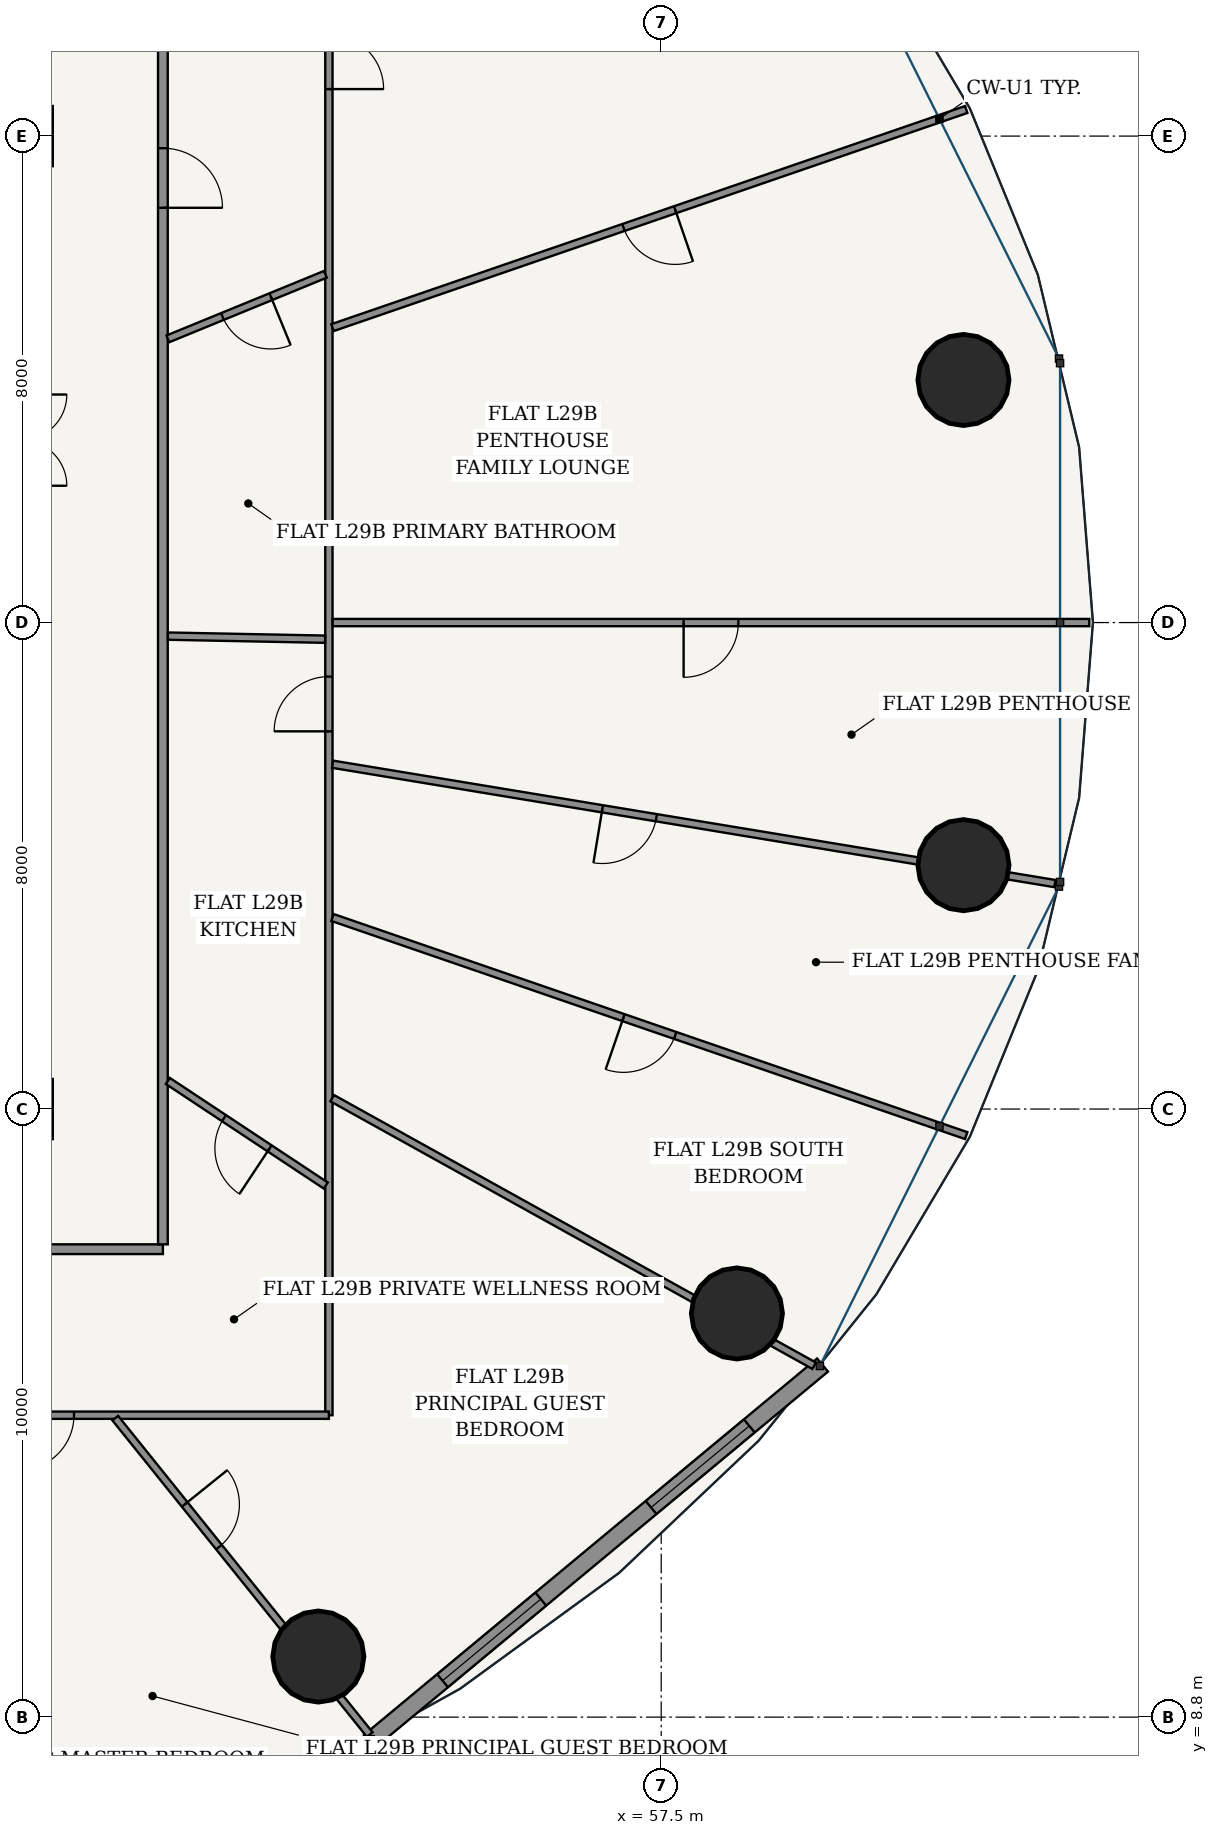
"""IFC4 building model, lengths in metres.
Left out: names, types, materials, properties, quantities, classifications, styles, units other than length and angle.
Written with IfcOpenShell. Run it as: python <this file> out.ifc"""

import sys

from ifc_helpers import new_model, si_unit, direction, frame, frame_2d, origin, origin_2d, place, context, subcontext, project, spatial, rectangle, hollow_circle, extrude, source, transform, mapped, element, fill, save


model = new_model("IFC4")
c1 = context("Model", 3, precision=1e-05, world=origin(), true_north=direction((-0.2419218956, 0.970295726276)))
c2 = subcontext(c1, "Body", "Model", "MODEL_VIEW")
j1 = project(units=[si_unit("LENGTHUNIT", "METRE"), si_unit("PLANEANGLEUNIT", "RADIAN")], contexts=[c1])
p1 = place(None, origin())
s1 = spatial("IfcSite", under=j1, at=p1, CompositionType="ELEMENT")
p2 = place(p1, origin())
s2 = spatial("IfcBuilding", under=s1, at=p2, CompositionType="ELEMENT")
p3 = place(p2, frame((0.0, 0.0, 112.2)))
s3 = spatial("IfcBuildingStorey", under=s2, at=p3, CompositionType="ELEMENT", Elevation=112.2)
for number, where, z_axis, x_axis in (
    (1, (62.471, 30.79, 0.0), (0.0, 0.0, 1.0), (1.0, 0.0, 0.0)),
    (2, (51.862, 9.796, 0.0), (0.0, 0.0, 1.0), (1.0, 0.0, 0.0)),
    (3, (58.745, 15.438, 0.0), (0.0, 0.0, 1.0), (1.0, 0.0, 0.0)),
    (4, (62.471, 22.81, 0.0), (0.0, 0.0, 1.0), (1.0, 0.0, 0.0)),
):
    element("IfcColumn", number, at=place(p3, frame(where, z_axis=z_axis, x_axis=x_axis)), inside=s3, PredefinedType="COLUMN", context=c2, shape_type="SweptSolid", body=[
        extrude(hollow_circle(Radius=0.75, WallThickness=0.045, at=origin_2d()), origin(), (0.0, 0.0, 1.0), 3.6),
    ])
p4 = place(p3, frame((52.7, 8.398, 0.0), z_axis=(0.0, 0.0, 1.0), x_axis=(0.769254958887, 0.638941944333, 0.0)))
e5 = element("IfcWall", 5, at=p4, inside=s3, PredefinedType="SOLIDWALL", context=c2, shape_type="SweptSolid", body=[
    extrude(rectangle(XDim=9.69, YDim=0.28, at=frame_2d((4.845, 0.0))), origin(), (0.0, 0.0, 1.0), 3.325),
])
p5 = place(p4, frame((1.566, 0.0, 0.85)))
e6 = element("IfcOpeningElement", 6, at=p5, cuts=e5, PredefinedType="OPENING", context=c2, shape_type="SweptSolid", body=[
    extrude(rectangle(XDim=2.1, YDim=1.95, at=frame_2d((1.05, 0.975))), frame((0.0, 0.15, 0.0), z_axis=(0.0, -1.0, 0.0), x_axis=(1.0, 0.0, 0.0)), (0.0, 0.0, 1.0), 0.3),
])
p6 = place(p4, frame((6.023, 0.0, 0.85)))
e7 = element("IfcOpeningElement", 7, at=p6, cuts=e5, PredefinedType="OPENING", context=c2, shape_type="SweptSolid", body=[
    extrude(rectangle(XDim=2.1, YDim=1.95, at=frame_2d((1.05, 0.975))), frame((0.0, 0.15, 0.0), z_axis=(0.0, -1.0, 0.0), x_axis=(1.0, 0.0, 0.0)), (0.0, 0.0, 1.0), 0.3),
])
p7 = place(p3, frame((26.695, 16.495, 0.0), z_axis=(0.0, 0.0, 1.0), x_axis=(1.0, 0.0, 0.0)))
e8 = element("IfcWall", 8, at=p7, inside=s3, PredefinedType="PARTITIONING", context=c2, shape_type="SweptSolid", body=[
    extrude(rectangle(XDim=22.61, YDim=0.16, at=frame_2d((11.305, 0.0))), origin(), (0.0, 0.0, 1.0), 2.767),
])
p8 = place(p3, frame((49.305, 16.575, 0.0), z_axis=(0.0, 0.0, 1.0), x_axis=(0.0, 1.0, 0.0)))
e9 = element("IfcWall", 9, at=p8, inside=s3, PredefinedType="PARTITIONING", context=c2, shape_type="SweptSolid", body=[
    extrude(rectangle(XDim=20.45, YDim=0.16, at=frame_2d((10.225, 0.0))), origin(), (0.0, 0.0, 1.0), 2.767),
])
p9 = place(p8, frame((17.046, 0.0, 0.0)))
e10 = element("IfcOpeningElement", 10, at=p9, cuts=e9, PredefinedType="OPENING", context=c2, shape_type="SweptSolid", body=[
    extrude(rectangle(XDim=0.98, YDim=2.2, at=frame_2d((0.49, 1.1))), frame((0.0, 0.09, 0.0), z_axis=(0.0, -1.0, 0.0), x_axis=(1.0, 0.0, 0.0)), (0.0, 0.0, 1.0), 0.18),
])
p10 = place(p3, frame((52.035, 39.835, 0.0), z_axis=(0.0, 0.0, 1.0), x_axis=(0.0, -1.0, 0.0)))
e11 = element("IfcWall", 11, at=p10, inside=s3, PredefinedType="PARTITIONING", context=c2, shape_type="SweptSolid", body=[
    extrude(rectangle(XDim=26.07, YDim=0.12, at=frame_2d((13.035, 0.0))), origin(), (0.0, 0.0, 1.0), 2.767),
])
p11 = place(p10, frame((3.362, 0.0, 0.0)))
e12 = element("IfcOpeningElement", 12, at=p11, cuts=e11, PredefinedType="OPENING", context=c2, shape_type="SweptSolid", body=[
    extrude(rectangle(XDim=0.9, YDim=2.15, at=frame_2d((0.45, 1.075))), frame((0.0, 0.07, 0.0), z_axis=(0.0, -1.0, 0.0), x_axis=(1.0, 0.0, 0.0)), (0.0, 0.0, 1.0), 0.14),
])
p12 = place(p10, frame((13.924, 0.0, 0.0)))
e13 = element("IfcOpeningElement", 13, at=p12, cuts=e11, PredefinedType="OPENING", context=c2, shape_type="SweptSolid", body=[
    extrude(rectangle(XDim=0.9, YDim=2.15, at=frame_2d((0.45, 1.075))), frame((0.0, 0.07, 0.0), z_axis=(0.0, -1.0, 0.0), x_axis=(1.0, 0.0, 0.0)), (0.0, 0.0, 1.0), 0.14),
])
p13 = place(p3, frame((52.035, 13.765, 0.0), z_axis=(0.0, 0.0, 1.0), x_axis=(-1.0, 0.0, 0.0)))
e14 = element("IfcWall", 14, at=p13, inside=s3, PredefinedType="PARTITIONING", context=c2, shape_type="SweptSolid", body=[
    extrude(rectangle(XDim=24.416, YDim=0.12, at=frame_2d((12.208, 0.0))), origin(), (0.0, 0.0, 1.0), 2.767),
])
p14 = place(p13, frame((4.192, 0.0, 0.0)))
e15 = element("IfcOpeningElement", 15, at=p14, cuts=e14, PredefinedType="OPENING", context=c2, shape_type="SweptSolid", body=[
    extrude(rectangle(XDim=0.9, YDim=2.15, at=frame_2d((0.45, 1.075))), frame((0.0, 0.07, 0.0), z_axis=(0.0, -1.0, 0.0), x_axis=(1.0, 0.0, 0.0)), (0.0, 0.0, 1.0), 0.14),
])
p15 = place(p13, frame((19.728, 0.0, 0.0)))
e16 = element("IfcOpeningElement", 16, at=p15, cuts=e14, PredefinedType="OPENING", context=c2, shape_type="SweptSolid", body=[
    extrude(rectangle(XDim=0.86, YDim=2.15, at=frame_2d((0.43, 1.075))), frame((0.0, 0.07, 0.0), z_axis=(0.0, -1.0, 0.0), x_axis=(1.0, 0.0, 0.0)), (0.0, 0.0, 1.0), 0.14),
])
p16 = place(p3, frame((44.526, 13.709, 0.0), z_axis=(0.0, 0.0, 1.0), x_axis=(0.446179583353, -0.894943450392, 0.0)))
e17 = element("IfcWall", 17, at=p16, inside=s3, PredefinedType="PARTITIONING", context=c2, shape_type="SweptSolid", body=[
    extrude(rectangle(XDim=8.125, YDim=0.12, at=frame_2d((4.062, 0.0))), origin(), (0.0, 0.0, 1.0), 2.767),
])
p17 = place(p16, frame((3.612, 0.0, 0.0)))
e18 = element("IfcOpeningElement", 18, at=p17, cuts=e17, PredefinedType="OPENING", context=c2, shape_type="SweptSolid", body=[
    extrude(rectangle(XDim=0.9, YDim=2.15, at=frame_2d((0.45, 1.075))), frame((0.0, 0.07, 0.0), z_axis=(0.0, -1.0, 0.0), x_axis=(1.0, 0.0, 0.0)), (0.0, 0.0, 1.0), 0.14),
])
p18 = place(p3, frame((48.522, 13.717, 0.0), z_axis=(0.0, 0.0, 1.0), x_axis=(0.626707979732, -0.77925419995, 0.0)))
e19 = element("IfcWall", 19, at=p18, inside=s3, PredefinedType="PARTITIONING", context=c2, shape_type="SweptSolid", body=[
    extrude(rectangle(XDim=6.679, YDim=0.12, at=frame_2d((3.339, 0.0))), origin(), (0.0, 0.0, 1.0), 2.767),
])
p19 = place(p18, frame((1.821, 0.0, 0.0)))
e20 = element("IfcOpeningElement", 20, at=p19, cuts=e19, PredefinedType="OPENING", context=c2, shape_type="SweptSolid", body=[
    extrude(rectangle(XDim=0.9, YDim=2.15, at=frame_2d((0.45, 1.075))), frame((0.0, 0.07, 0.0), z_axis=(0.0, -1.0, 0.0), x_axis=(1.0, 0.0, 0.0)), (0.0, 0.0, 1.0), 0.14),
])
p20 = place(p3, frame((52.089, 18.979, 0.0), z_axis=(0.0, 0.0, 1.0), x_axis=(0.874313476423, -0.485361664066, 0.0)))
e21 = element("IfcWall", 21, at=p20, inside=s3, PredefinedType="PARTITIONING", context=c2, shape_type="SweptSolid", body=[
    extrude(rectangle(XDim=9.066, YDim=0.12, at=frame_2d((4.533, 0.0))), origin(), (0.0, 0.0, 1.0), 2.767),
])
p21 = place(p3, frame((52.094, 21.95, 0.0), z_axis=(0.0, 0.0, 1.0), x_axis=(0.945573120726, -0.32540970078, 0.0)))
e22 = element("IfcWall", 22, at=p21, inside=s3, PredefinedType="PARTITIONING", context=c2, shape_type="SweptSolid", body=[
    extrude(rectangle(XDim=11.022, YDim=0.12, at=frame_2d((5.511, 0.0))), origin(), (0.0, 0.0, 1.0), 2.767),
])
p22 = place(p21, frame((5.061, 0.0, 0.0)))
e23 = element("IfcOpeningElement", 23, at=p22, cuts=e22, PredefinedType="OPENING", context=c2, shape_type="SweptSolid", body=[
    extrude(rectangle(XDim=0.9, YDim=2.15, at=frame_2d((0.45, 1.075))), frame((0.0, 0.07, 0.0), z_axis=(0.0, -1.0, 0.0), x_axis=(1.0, 0.0, 0.0)), (0.0, 0.0, 1.0), 0.14),
])
p23 = place(p3, frame((52.096, 24.47, 0.0), z_axis=(0.0, 0.0, 1.0), x_axis=(0.986618264768, -0.163047231274, 0.0)))
e24 = element("IfcWall", 24, at=p23, inside=s3, PredefinedType="PARTITIONING", context=c2, shape_type="SweptSolid", body=[
    extrude(rectangle(XDim=12.039, YDim=0.12, at=frame_2d((6.02, 0.0))), origin(), (0.0, 0.0, 1.0), 2.767),
])
p24 = place(p23, frame((4.496, 0.0, 0.0)))
e25 = element("IfcOpeningElement", 25, at=p24, cuts=e24, PredefinedType="OPENING", context=c2, shape_type="SweptSolid", body=[
    extrude(rectangle(XDim=0.9, YDim=2.15, at=frame_2d((0.45, 1.075))), frame((0.0, 0.07, 0.0), z_axis=(0.0, -1.0, 0.0), x_axis=(1.0, 0.0, 0.0)), (0.0, 0.0, 1.0), 0.14),
])
p25 = place(p3, frame((52.097, 26.8, 0.0), z_axis=(0.0, 0.0, 1.0), x_axis=(1.0, 0.0, 0.0)))
e26 = element("IfcWall", 26, at=p25, inside=s3, PredefinedType="PARTITIONING", context=c2, shape_type="SweptSolid", body=[
    extrude(rectangle(XDim=12.443, YDim=0.12, at=frame_2d((6.222, 0.0))), origin(), (0.0, 0.0, 1.0), 2.767),
])
p26 = place(p25, frame((5.771, 0.0, 0.0)))
e27 = element("IfcOpeningElement", 27, at=p26, cuts=e26, PredefinedType="OPENING", context=c2, shape_type="SweptSolid", body=[
    extrude(rectangle(XDim=0.9, YDim=2.15, at=frame_2d((0.45, 1.075))), frame((0.0, 0.07, 0.0), z_axis=(0.0, -1.0, 0.0), x_axis=(1.0, 0.0, 0.0)), (0.0, 0.0, 1.0), 0.14),
])
p27 = place(p3, frame((52.094, 31.65, 0.0), z_axis=(0.0, 0.0, 1.0), x_axis=(0.945573120726, 0.32540970078, 0.0)))
e28 = element("IfcWall", 28, at=p27, inside=s3, PredefinedType="PARTITIONING", context=c2, shape_type="SweptSolid", body=[
    extrude(rectangle(XDim=11.022, YDim=0.12, at=frame_2d((5.511, 0.0))), origin(), (0.0, 0.0, 1.0), 2.767),
])
p28 = place(p27, frame((5.061, 0.0, 0.0)))
e29 = element("IfcOpeningElement", 29, at=p28, cuts=e28, PredefinedType="OPENING", context=c2, shape_type="SweptSolid", body=[
    extrude(rectangle(XDim=0.9, YDim=2.15, at=frame_2d((0.45, 1.075))), frame((0.0, 0.07, 0.0), z_axis=(0.0, -1.0, 0.0), x_axis=(1.0, 0.0, 0.0)), (0.0, 0.0, 1.0), 0.14),
])
p29 = place(p3, frame((49.387, 19.261, 0.0), z_axis=(0.0, 0.0, 1.0), x_axis=(0.833806969544, -0.552056099993, 0.0)))
e30 = element("IfcWall", 30, at=p29, inside=s3, PredefinedType="PARTITIONING", context=c2, shape_type="SweptSolid", body=[
    extrude(rectangle(XDim=3.114, YDim=0.12, at=frame_2d((1.557, 0.0))), origin(), (0.0, 0.0, 1.0), 3.325),
])
p30 = place(p29, frame((1.107, 0.0, 0.0)))
e31 = element("IfcOpeningElement", 31, at=p30, cuts=e30, PredefinedType="OPENING", context=c2, shape_type="SweptSolid", body=[
    extrude(rectangle(XDim=0.9, YDim=2.15, at=frame_2d((0.45, 1.075))), frame((0.0, 0.07, 0.0), z_axis=(0.0, -1.0, 0.0), x_axis=(1.0, 0.0, 0.0)), (0.0, 0.0, 1.0), 0.14),
])
p31 = place(p3, frame((49.387, 26.577, 0.0), z_axis=(0.0, 0.0, 1.0), x_axis=(0.999807240787, -0.019633676934, 0.0)))
e32 = element("IfcWall", 32, at=p31, inside=s3, PredefinedType="PARTITIONING", context=c2, shape_type="SweptSolid", body=[
    extrude(rectangle(XDim=2.586, YDim=0.12, at=frame_2d((1.293, 0.0))), origin(), (0.0, 0.0, 1.0), 3.325),
])
p32 = place(p3, frame((49.387, 31.465, 0.0), z_axis=(0.0, 0.0, 1.0), x_axis=(0.925328713836, 0.37916588896, 0.0)))
e33 = element("IfcWall", 33, at=p32, inside=s3, PredefinedType="PARTITIONING", context=c2, shape_type="SweptSolid", body=[
    extrude(rectangle(XDim=2.8, YDim=0.12, at=frame_2d((1.4, 0.0))), origin(), (0.0, 0.0, 1.0), 3.325),
])
p33 = place(p32, frame((0.97, 0.0, 0.0)))
e34 = element("IfcOpeningElement", 34, at=p33, cuts=e33, PredefinedType="OPENING", context=c2, shape_type="SweptSolid", body=[
    extrude(rectangle(XDim=0.86, YDim=2.15, at=frame_2d((0.43, 1.075))), frame((0.0, 0.07, 0.0), z_axis=(0.0, -1.0, 0.0), x_axis=(1.0, 0.0, 0.0)), (0.0, 0.0, 1.0), 0.14),
])
m1 = source(origin(), c2, "Body", "SweptSolid", [
    extrude(rectangle(XDim=2.1, YDim=1.95, at=frame_2d((1.05, 0.975))), frame((0.0, 0.03, 0.0), z_axis=(0.0, -1.0, 0.0), x_axis=(1.0, 0.0, 0.0)), (0.0, 0.0, 1.0), 0.06),
])
p34 = place(p5, origin())
e35 = element("IfcWindow", 35, at=p34, inside=s3, PartitioningType="SINGLE_PANEL", PredefinedType="WINDOW", context=c2, shape_type="MappedRepresentation", body=[
    mapped(m1, transform((0.0, 0.0, 0.0), scale=1.0)),
])
fill(e6, e35)
p35 = place(p6, origin())
e36 = element("IfcWindow", 36, at=p35, inside=s3, PartitioningType="SINGLE_PANEL", PredefinedType="WINDOW", context=c2, shape_type="MappedRepresentation", body=[
    mapped(m1, transform((0.0, 0.0, 0.0), scale=1.0)),
])
fill(e7, e36)
m2 = source(origin(), c2, "Body", "SweptSolid", [
    extrude(rectangle(XDim=0.98, YDim=2.2, at=frame_2d((0.49, 1.1))), frame((0.0, 0.025, 0.0), z_axis=(0.0, -1.0, 0.0), x_axis=(1.0, 0.0, 0.0)), (0.0, 0.0, 1.0), 0.05),
])
p36 = place(p9, frame((0.98, 0.0, 0.0), z_axis=(0.0, 0.0, 1.0), x_axis=(-1.0, 0.0, 0.0)))
e37 = element("IfcDoor", 37, at=p36, inside=s3, OperationType="SINGLE_SWING_RIGHT", PredefinedType="DOOR", context=c2, shape_type="MappedRepresentation", body=[
    mapped(m2, transform((0.0, 0.0, 0.0), scale=1.0)),
])
fill(e10, e37)
m3 = source(origin(), c2, "Body", "SweptSolid", [
    extrude(rectangle(XDim=0.86, YDim=2.15, at=frame_2d((0.43, 1.075))), frame((0.0, 0.025, 0.0), z_axis=(0.0, -1.0, 0.0), x_axis=(1.0, 0.0, 0.0)), (0.0, 0.0, 1.0), 0.05),
])
p37 = place(p33, frame((0.86, 0.0, 0.0), z_axis=(0.0, 0.0, 1.0), x_axis=(-1.0, 0.0, 0.0)))
e38 = element("IfcDoor", 38, at=p37, inside=s3, OperationType="SINGLE_SWING_LEFT", PredefinedType="DOOR", context=c2, shape_type="MappedRepresentation", body=[
    mapped(m3, transform((0.0, 0.0, 0.0), scale=1.0)),
])
fill(e34, e38)
m4 = source(origin(), c2, "Body", "SweptSolid", [
    extrude(rectangle(XDim=0.9, YDim=2.15, at=frame_2d((0.45, 1.075))), frame((0.0, 0.025, 0.0), z_axis=(0.0, -1.0, 0.0), x_axis=(1.0, 0.0, 0.0)), (0.0, 0.0, 1.0), 0.05),
])
p38 = place(p11, origin())
e39 = element("IfcDoor", 39, at=p38, inside=s3, OperationType="SINGLE_SWING_RIGHT", PredefinedType="DOOR", context=c2, shape_type="MappedRepresentation", body=[
    mapped(m4, transform((0.0, 0.0, 0.0), scale=1.0)),
])
fill(e12, e39)
p39 = place(p28, frame((0.9, 0.0, 0.0), z_axis=(0.0, 0.0, 1.0), x_axis=(-1.0, 0.0, 0.0)))
e40 = element("IfcDoor", 40, at=p39, inside=s3, OperationType="SINGLE_SWING_LEFT", PredefinedType="DOOR", context=c2, shape_type="MappedRepresentation", body=[
    mapped(m4, transform((0.0, 0.0, 0.0), scale=1.0)),
])
fill(e29, e40)
p40 = place(p26, frame((0.9, 0.0, 0.0), z_axis=(0.0, 0.0, 1.0), x_axis=(-1.0, 0.0, 0.0)))
e41 = element("IfcDoor", 41, at=p40, inside=s3, OperationType="SINGLE_SWING_RIGHT", PredefinedType="DOOR", context=c2, shape_type="MappedRepresentation", body=[
    mapped(m4, transform((0.0, 0.0, 0.0), scale=1.0)),
])
fill(e27, e41)
p41 = place(p12, frame((0.9, 0.0, 0.0), z_axis=(0.0, 0.0, 1.0), x_axis=(-1.0, 0.0, 0.0)))
e42 = element("IfcDoor", 42, at=p41, inside=s3, OperationType="SINGLE_SWING_LEFT", PredefinedType="DOOR", context=c2, shape_type="MappedRepresentation", body=[
    mapped(m4, transform((0.0, 0.0, 0.0), scale=1.0)),
])
fill(e13, e42)
p42 = place(p24, frame((0.9, 0.0, 0.0), z_axis=(0.0, 0.0, 1.0), x_axis=(-1.0, 0.0, 0.0)))
e43 = element("IfcDoor", 43, at=p42, inside=s3, OperationType="SINGLE_SWING_RIGHT", PredefinedType="DOOR", context=c2, shape_type="MappedRepresentation", body=[
    mapped(m4, transform((0.0, 0.0, 0.0), scale=1.0)),
])
fill(e25, e43)
p43 = place(p30, frame((0.9, 0.0, 0.0), z_axis=(0.0, 0.0, 1.0), x_axis=(-1.0, 0.0, 0.0)))
e44 = element("IfcDoor", 44, at=p43, inside=s3, OperationType="SINGLE_SWING_LEFT", PredefinedType="DOOR", context=c2, shape_type="MappedRepresentation", body=[
    mapped(m4, transform((0.0, 0.0, 0.0), scale=1.0)),
])
fill(e31, e44)
p44 = place(p14, origin())
e45 = element("IfcDoor", 45, at=p44, inside=s3, OperationType="SINGLE_SWING_RIGHT", PredefinedType="DOOR", context=c2, shape_type="MappedRepresentation", body=[
    mapped(m4, transform((0.0, 0.0, 0.0), scale=1.0)),
])
fill(e15, e45)
p45 = place(p19, origin())
e46 = element("IfcDoor", 46, at=p45, inside=s3, OperationType="SINGLE_SWING_LEFT", PredefinedType="DOOR", context=c2, shape_type="MappedRepresentation", body=[
    mapped(m4, transform((0.0, 0.0, 0.0), scale=1.0)),
])
fill(e20, e46)
p46 = place(p22, frame((0.9, 0.0, 0.0), z_axis=(0.0, 0.0, 1.0), x_axis=(-1.0, 0.0, 0.0)))
e47 = element("IfcDoor", 47, at=p46, inside=s3, OperationType="SINGLE_SWING_RIGHT", PredefinedType="DOOR", context=c2, shape_type="MappedRepresentation", body=[
    mapped(m4, transform((0.0, 0.0, 0.0), scale=1.0)),
])
fill(e23, e47)
save(model, sys.argv[1])
